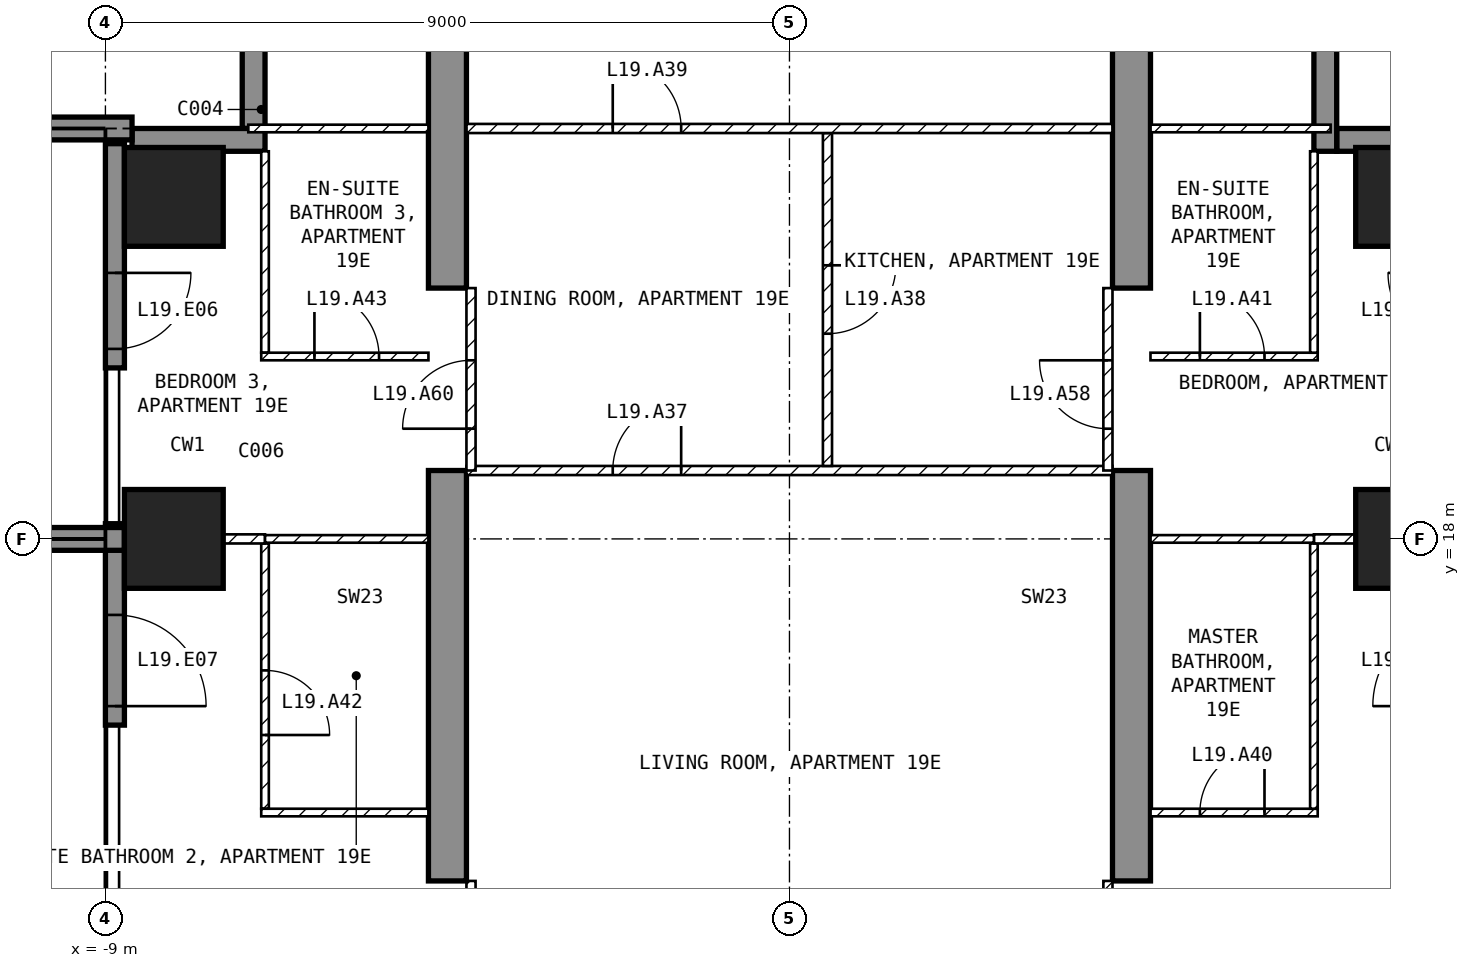
"""IFC4 building model, lengths in metres.
Left out: names, types, materials, properties, quantities, classifications, styles, units other than length and angle.
Written with IfcOpenShell. Run it as: python <this file> out.ifc"""

import sys

from ifc_helpers import new_model, si_unit, direction, frame, frame_2d, origin, origin_2d, place, context, subcontext, project, spatial, polyline, rectangle, outline, extrude, element, fill, save


model = new_model("IFC4")
c1 = context("Model", 3, precision=1e-05, world=origin(), true_north=direction((0.0, 1.0)))
c2 = subcontext(c1, "Body", "Model", "MODEL_VIEW")
j1 = project(units=[si_unit("LENGTHUNIT", "METRE"), si_unit("PLANEANGLEUNIT", "RADIAN")], contexts=[c1])
p1 = place(None, origin())
s1 = spatial("IfcSite", under=j1, at=p1, CompositionType="ELEMENT")
p2 = place(p1, origin())
s2 = spatial("IfcBuilding", under=s1, at=p2, CompositionType="ELEMENT")
p3 = place(p2, frame((0.0, 0.0, 85.5)))
s3 = spatial("IfcBuildingStorey", under=s2, at=p3, CompositionType="ELEMENT", Elevation=85.5)
for number, where, z_axis, x_axis in (
    (1, (-8.1, 18.0, -0.25), (0.0, 0.0, 1.0), (1.0, 0.0, 0.0)),
    (2, (-8.1, 22.5, -0.25), (0.0, 0.0, 1.0), (1.0, 0.0, 0.0)),
    (3, (8.1, 18.0, -0.25), (0.0, 0.0, 1.0), (1.0, 0.0, 0.0)),
    (4, (8.1, 22.5, -0.25), (0.0, 0.0, 1.0), (1.0, 0.0, 0.0)),
):
    element("IfcColumn", number, at=place(p3, frame(where, z_axis=z_axis, x_axis=x_axis)), inside=s3, PredefinedType="COLUMN", context=c2, shape_type="SweptSolid", body=[
        extrude(rectangle(XDim=1.3, YDim=1.3, at=origin_2d()), origin(), (0.0, 0.0, 1.0), 3.5),
    ])
for number, where, z_axis, x_axis in (
    (5, (-4.75, 9.0, -0.25), (1.0, 0.0, 0.0), (0.0, 1.0, 0.0)),
    (6, (4.25, 9.0, -0.25), (1.0, 0.0, 0.0), (0.0, 1.0, 0.0)),
):
    element("IfcWall", number, at=place(p3, frame(where, z_axis=z_axis, x_axis=x_axis)), inside=s3, PredefinedType="SHEAR", context=c2, shape_type="SweptSolid", body=[
        extrude(outline(polyline([(0.0, 0.0), (2.1, 0.0), (2.1, 2.65), (4.5, 2.65), (4.5, 0.0), (9.9, 0.0), (9.9, 2.65), (12.3, 2.65), (12.3, 0.0), (16.45, 0.0), (16.45, 3.5), (0.0, 3.5), (0.0, 0.0)])), origin(), (0.0, 0.0, 1.0), 0.5),
    ])
p4 = place(p3, frame((-8.875, 23.2, 0.0), z_axis=(0.0, 0.0, 1.0), x_axis=(0.0, -1.0, 0.0)))
e7 = element("IfcWall", 7, at=p4, inside=s3, PredefinedType="SOLIDWALL", context=c2, shape_type="SweptSolid", body=[
    extrude(rectangle(XDim=2.95, YDim=0.25, at=frame_2d((1.475, 0.0))), origin(), (0.0, 0.0, 1.0), 3.25),
])
p5 = place(p4, frame((1.7, 0.0, 0.0)))
e8 = element("IfcOpeningElement", 8, at=p5, cuts=e7, PredefinedType="OPENING", context=c2, shape_type="SweptSolid", body=[
    extrude(rectangle(XDim=1.0, YDim=2.4, at=frame_2d((0.5, 1.2))), frame((0.0, 0.135, 0.0), z_axis=(0.0, -1.0, 0.0), x_axis=(1.0, 0.0, 0.0)), (0.0, 0.0, 1.0), 0.27),
])
p6 = place(p3, frame((-8.875, 18.2, 0.0), z_axis=(0.0, 0.0, 1.0), x_axis=(0.0, -1.0, 0.0)))
e9 = element("IfcWall", 9, at=p6, inside=s3, PredefinedType="SOLIDWALL", context=c2, shape_type="SweptSolid", body=[
    extrude(rectangle(XDim=2.65, YDim=0.25, at=frame_2d((1.325, 0.0))), origin(), (0.0, 0.0, 1.0), 3.25),
])
p7 = place(p6, frame((1.2, 0.0, 0.0)))
e10 = element("IfcOpeningElement", 10, at=p7, cuts=e9, PredefinedType="OPENING", context=c2, shape_type="SweptSolid", body=[
    extrude(rectangle(XDim=1.2, YDim=2.4, at=frame_2d((0.6, 1.2))), frame((0.0, 0.135, 0.0), z_axis=(0.0, -1.0, 0.0), x_axis=(1.0, 0.0, 0.0)), (0.0, 0.0, 1.0), 0.27),
])
p8 = place(p3, frame((8.65, 23.25, 0.0), z_axis=(0.0, 0.0, 1.0), x_axis=(-1.0, 0.0, 0.0)))
e11 = element("IfcWall", 11, at=p8, inside=s3, PredefinedType="SOLIDWALL", context=c2, shape_type="SweptSolid", body=[
    extrude(rectangle(XDim=1.45, YDim=0.3, at=frame_2d((0.725, 0.0))), origin(), (0.0, 0.0, 1.0), 3.25),
])
p9 = place(p3, frame((7.05, 23.1, 0.0), z_axis=(0.0, 0.0, 1.0), x_axis=(0.0, 1.0, 0.0)))
e12 = element("IfcWall", 12, at=p9, inside=s3, PredefinedType="SOLIDWALL", context=c2, shape_type="SweptSolid", body=[
    extrude(rectangle(XDim=1.8, YDim=0.3, at=frame_2d((0.9, 0.0))), origin(), (0.0, 0.0, 1.0), 3.25),
])
p10 = place(p3, frame((-7.05, 25.2, 0.0), z_axis=(0.0, 0.0, 1.0), x_axis=(0.0, -1.0, 0.0)))
e13 = element("IfcWall", 13, at=p10, inside=s3, PredefinedType="SOLIDWALL", context=c2, shape_type="SweptSolid", body=[
    extrude(rectangle(XDim=1.8, YDim=0.3, at=frame_2d((0.9, 0.0))), origin(), (0.0, 0.0, 1.0), 3.25),
])
p11 = place(p3, frame((-6.9, 23.25, 0.0), z_axis=(0.0, 0.0, 1.0), x_axis=(-1.0, 0.0, 0.0)))
e14 = element("IfcWall", 14, at=p11, inside=s3, PredefinedType="SOLIDWALL", context=c2, shape_type="SweptSolid", body=[
    extrude(rectangle(XDim=1.75, YDim=0.3, at=frame_2d((0.875, 0.0))), origin(), (0.0, 0.0, 1.0), 3.25),
])
p12 = place(p3, frame((-8.75, 18.0, 0.0), z_axis=(0.0, 0.0, 1.0), x_axis=(-1.0, 0.0, 0.0)))
e15 = element("IfcWall", 15, at=p12, inside=s3, PredefinedType="SOLIDWALL", context=c2, shape_type="SweptSolid", body=[
    extrude(rectangle(XDim=2.95, YDim=0.3, at=frame_2d((1.475, 0.0))), origin(), (0.0, 0.0, 1.0), 3.25),
])
p13 = place(p3, frame((-8.65, 23.4, 0.0), z_axis=(0.0, 0.0, 1.0), x_axis=(-1.0, 0.0, 0.0)))
e16 = element("IfcWall", 16, at=p13, inside=s3, PredefinedType="SOLIDWALL", context=c2, shape_type="SweptSolid", body=[
    extrude(rectangle(XDim=3.05, YDim=0.3, at=frame_2d((1.525, 0.0))), origin(), (0.0, 0.0, 1.0), 3.25),
])
p14 = place(p3, frame((-4.25, 18.9, 0.0), z_axis=(0.0, 0.0, 1.0), x_axis=(1.0, 0.0, 0.0)))
e17 = element("IfcWall", 17, at=p14, inside=s3, PredefinedType="PARTITIONING", context=c2, shape_type="SweptSolid", body=[
    extrude(rectangle(XDim=8.5, YDim=0.12, at=frame_2d((4.25, 0.0))), origin(), (0.0, 0.0, 1.0), 3.25),
])
p15 = place(p14, frame((1.925, 0.0, 0.0)))
e18 = element("IfcOpeningElement", 18, at=p15, cuts=e17, PredefinedType="OPENING", context=c2, shape_type="SweptSolid", body=[
    extrude(rectangle(XDim=0.9, YDim=2.1, at=frame_2d((0.45, 1.05))), frame((0.0, 0.07, 0.0), z_axis=(0.0, -1.0, 0.0), x_axis=(1.0, 0.0, 0.0)), (0.0, 0.0, 1.0), 0.14),
])
p16 = place(p3, frame((0.5, 23.34, 0.0), z_axis=(0.0, 0.0, 1.0), x_axis=(0.0, -1.0, 0.0)))
e19 = element("IfcWall", 19, at=p16, inside=s3, PredefinedType="PARTITIONING", context=c2, shape_type="SweptSolid", body=[
    extrude(rectangle(XDim=4.38, YDim=0.12, at=frame_2d((2.19, 0.0))), origin(), (0.0, 0.0, 1.0), 3.25),
])
p17 = place(p16, frame((1.74, 0.0, 0.0)))
e20 = element("IfcOpeningElement", 20, at=p17, cuts=e19, PredefinedType="OPENING", context=c2, shape_type="SweptSolid", body=[
    extrude(rectangle(XDim=0.9, YDim=2.1, at=frame_2d((0.45, 1.05))), frame((0.0, 0.07, 0.0), z_axis=(0.0, -1.0, 0.0), x_axis=(1.0, 0.0, 0.0)), (0.0, 0.0, 1.0), 0.14),
])
p18 = place(p3, frame((-4.25, 23.4, 0.0), z_axis=(0.0, 0.0, 1.0), x_axis=(1.0, 0.0, 0.0)))
e21 = element("IfcWall", 21, at=p18, inside=s3, PredefinedType="PARTITIONING", context=c2, shape_type="SweptSolid", body=[
    extrude(rectangle(XDim=8.5, YDim=0.12, at=frame_2d((4.25, 0.0))), origin(), (0.0, 0.0, 1.0), 3.25),
])
p19 = place(p18, frame((1.925, 0.0, 0.0)))
e22 = element("IfcOpeningElement", 22, at=p19, cuts=e21, PredefinedType="OPENING", context=c2, shape_type="SweptSolid", body=[
    extrude(rectangle(XDim=0.9, YDim=2.1, at=frame_2d((0.45, 1.05))), frame((0.0, 0.07, 0.0), z_axis=(0.0, -1.0, 0.0), x_axis=(1.0, 0.0, 0.0)), (0.0, 0.0, 1.0), 0.14),
])
p20 = place(p3, frame((4.75, 14.4, 0.0), z_axis=(0.0, 0.0, 1.0), x_axis=(1.0, 0.0, 0.0)))
e23 = element("IfcWall", 23, at=p20, inside=s3, PredefinedType="PARTITIONING", context=c2, shape_type="SweptSolid", body=[
    extrude(rectangle(XDim=2.2, YDim=0.1, at=frame_2d((1.1, 0.0))), origin(), (0.0, 0.0, 1.0), 3.25),
])
p21 = place(p20, frame((0.65, 0.0, 0.0)))
e24 = element("IfcOpeningElement", 24, at=p21, cuts=e23, PredefinedType="OPENING", context=c2, shape_type="SweptSolid", body=[
    extrude(rectangle(XDim=0.85, YDim=2.1, at=frame_2d((0.425, 1.05))), frame((0.0, 0.06, 0.0), z_axis=(0.0, -1.0, 0.0), x_axis=(1.0, 0.0, 0.0)), (0.0, 0.0, 1.0), 0.12),
])
p22 = place(p3, frame((6.9, 14.45, 0.0), z_axis=(0.0, 0.0, 1.0), x_axis=(0.0, 1.0, 0.0)))
e25 = element("IfcWall", 25, at=p22, inside=s3, PredefinedType="PARTITIONING", context=c2, shape_type="SweptSolid", body=[
    extrude(rectangle(XDim=3.49, YDim=0.1, at=frame_2d((1.745, 0.0))), origin(), (0.0, 0.0, 1.0), 3.25),
])
p23 = place(p3, frame((6.9, 18.0, 0.0), z_axis=(0.0, 0.0, 1.0), x_axis=(1.0, 0.0, 0.0)))
e26 = element("IfcWall", 26, at=p23, inside=s3, PredefinedType="PARTITIONING", context=c2, shape_type="SweptSolid", body=[
    extrude(rectangle(XDim=0.55, YDim=0.12, at=frame_2d((0.275, 0.0))), origin(), (0.0, 0.0, 1.0), 2.346),
])
p24 = place(p3, frame((4.75, 18.0, 0.0), z_axis=(0.0, 0.0, 1.0), x_axis=(1.0, 0.0, 0.0)))
e27 = element("IfcWall", 27, at=p24, inside=s3, PredefinedType="PARTITIONING", context=c2, shape_type="SweptSolid", body=[
    extrude(rectangle(XDim=2.15, YDim=0.1, at=frame_2d((1.075, 0.0))), origin(), (0.0, 0.0, 1.0), 2.346),
])
p25 = place(p3, frame((4.75, 20.4, 0.0), z_axis=(0.0, 0.0, 1.0), x_axis=(1.0, 0.0, 0.0)))
e28 = element("IfcWall", 28, at=p25, inside=s3, PredefinedType="PARTITIONING", context=c2, shape_type="SweptSolid", body=[
    extrude(rectangle(XDim=2.2, YDim=0.1, at=frame_2d((1.1, 0.0))), origin(), (0.0, 0.0, 1.0), 3.25),
])
p26 = place(p25, frame((0.65, 0.0, 0.0)))
e29 = element("IfcOpeningElement", 29, at=p26, cuts=e28, PredefinedType="OPENING", context=c2, shape_type="SweptSolid", body=[
    extrude(rectangle(XDim=0.85, YDim=2.1, at=frame_2d((0.425, 1.05))), frame((0.0, 0.06, 0.0), z_axis=(0.0, -1.0, 0.0), x_axis=(1.0, 0.0, 0.0)), (0.0, 0.0, 1.0), 0.12),
])
p27 = place(p3, frame((6.9, 20.45, 0.0), z_axis=(0.0, 0.0, 1.0), x_axis=(0.0, 1.0, 0.0)))
e30 = element("IfcWall", 30, at=p27, inside=s3, PredefinedType="PARTITIONING", context=c2, shape_type="SweptSolid", body=[
    extrude(rectangle(XDim=2.65, YDim=0.1, at=frame_2d((1.325, 0.0))), origin(), (0.0, 0.0, 1.0), 3.25),
])
p28 = place(p3, frame((4.75, 23.4, 0.0), z_axis=(0.0, 0.0, 1.0), x_axis=(1.0, 0.0, 0.0)))
e31 = element("IfcWall", 31, at=p28, inside=s3, PredefinedType="PARTITIONING", context=c2, shape_type="SweptSolid", body=[
    extrude(rectangle(XDim=2.37, YDim=0.1, at=frame_2d((1.185, 0.0))), origin(), (0.0, 0.0, 1.0), 3.25),
])
p29 = place(p3, frame((-6.9, 17.94, 0.0), z_axis=(0.0, 0.0, 1.0), x_axis=(0.0, -1.0, 0.0)))
e32 = element("IfcWall", 32, at=p29, inside=s3, PredefinedType="PARTITIONING", context=c2, shape_type="SweptSolid", body=[
    extrude(rectangle(XDim=3.49, YDim=0.1, at=frame_2d((1.745, 0.0))), origin(), (0.0, 0.0, 1.0), 3.25),
])
p30 = place(p29, frame((1.67, 0.0, 0.0)))
e33 = element("IfcOpeningElement", 33, at=p30, cuts=e32, PredefinedType="OPENING", context=c2, shape_type="SweptSolid", body=[
    extrude(rectangle(XDim=0.85, YDim=2.1, at=frame_2d((0.425, 1.05))), frame((0.0, 0.06, 0.0), z_axis=(0.0, -1.0, 0.0), x_axis=(1.0, 0.0, 0.0)), (0.0, 0.0, 1.0), 0.12),
])
p31 = place(p3, frame((-6.95, 14.4, 0.0), z_axis=(0.0, 0.0, 1.0), x_axis=(1.0, 0.0, 0.0)))
e34 = element("IfcWall", 34, at=p31, inside=s3, PredefinedType="PARTITIONING", context=c2, shape_type="SweptSolid", body=[
    extrude(rectangle(XDim=2.2, YDim=0.1, at=frame_2d((1.1, 0.0))), origin(), (0.0, 0.0, 1.0), 3.25),
])
p32 = place(p3, frame((-7.45, 18.0, 0.0), z_axis=(0.0, 0.0, 1.0), x_axis=(1.0, 0.0, 0.0)))
e35 = element("IfcWall", 35, at=p32, inside=s3, PredefinedType="PARTITIONING", context=c2, shape_type="SweptSolid", body=[
    extrude(rectangle(XDim=0.55, YDim=0.12, at=frame_2d((0.275, 0.0))), origin(), (0.0, 0.0, 1.0), 2.346),
])
p33 = place(p3, frame((-6.9, 18.0, 0.0), z_axis=(0.0, 0.0, 1.0), x_axis=(1.0, 0.0, 0.0)))
e36 = element("IfcWall", 36, at=p33, inside=s3, PredefinedType="PARTITIONING", context=c2, shape_type="SweptSolid", body=[
    extrude(rectangle(XDim=2.15, YDim=0.1, at=frame_2d((1.075, 0.0))), origin(), (0.0, 0.0, 1.0), 2.346),
])
p34 = place(p3, frame((-6.9, 23.1, 0.0), z_axis=(0.0, 0.0, 1.0), x_axis=(0.0, -1.0, 0.0)))
e37 = element("IfcWall", 37, at=p34, inside=s3, PredefinedType="PARTITIONING", context=c2, shape_type="SweptSolid", body=[
    extrude(rectangle(XDim=2.65, YDim=0.1, at=frame_2d((1.325, 0.0))), origin(), (0.0, 0.0, 1.0), 3.25),
])
p35 = place(p3, frame((-6.95, 20.4, 0.0), z_axis=(0.0, 0.0, 1.0), x_axis=(1.0, 0.0, 0.0)))
e38 = element("IfcWall", 38, at=p35, inside=s3, PredefinedType="PARTITIONING", context=c2, shape_type="SweptSolid", body=[
    extrude(rectangle(XDim=2.2, YDim=0.1, at=frame_2d((1.1, 0.0))), origin(), (0.0, 0.0, 1.0), 3.25),
])
p36 = place(p35, frame((0.7, 0.0, 0.0)))
e39 = element("IfcOpeningElement", 39, at=p36, cuts=e38, PredefinedType="OPENING", context=c2, shape_type="SweptSolid", body=[
    extrude(rectangle(XDim=0.85, YDim=2.1, at=frame_2d((0.425, 1.05))), frame((0.0, 0.06, 0.0), z_axis=(0.0, -1.0, 0.0), x_axis=(1.0, 0.0, 0.0)), (0.0, 0.0, 1.0), 0.12),
])
p37 = place(p3, frame((-7.12, 23.4, 0.0), z_axis=(0.0, 0.0, 1.0), x_axis=(1.0, 0.0, 0.0)))
e40 = element("IfcWall", 40, at=p37, inside=s3, PredefinedType="PARTITIONING", context=c2, shape_type="SweptSolid", body=[
    extrude(rectangle(XDim=2.37, YDim=0.1, at=frame_2d((1.185, 0.0))), origin(), (0.0, 0.0, 1.0), 3.25),
])
p38 = place(p3, frame((4.19, 11.1, 0.0), z_axis=(0.0, 0.0, 1.0), x_axis=(0.0, 1.0, 0.0)))
e41 = element("IfcWall", 41, at=p38, inside=s3, PredefinedType="PARTITIONING", context=c2, shape_type="SweptSolid", body=[
    extrude(rectangle(XDim=2.4, YDim=0.12, at=frame_2d((1.2, 0.0))), origin(), (0.0, 0.0, 1.0), 2.4),
])
p39 = place(p38, frame((0.75, 0.0, 0.0)))
e42 = element("IfcOpeningElement", 42, at=p39, cuts=e41, PredefinedType="OPENING", context=c2, shape_type="SweptSolid", body=[
    extrude(rectangle(XDim=0.9, YDim=2.1, at=frame_2d((0.45, 1.05))), frame((0.0, 0.07, 0.0), z_axis=(0.0, -1.0, 0.0), x_axis=(1.0, 0.0, 0.0)), (0.0, 0.0, 1.0), 0.14),
])
p40 = place(p3, frame((4.19, 18.9, 0.0), z_axis=(0.0, 0.0, 1.0), x_axis=(0.0, 1.0, 0.0)))
e43 = element("IfcWall", 43, at=p40, inside=s3, PredefinedType="PARTITIONING", context=c2, shape_type="SweptSolid", body=[
    extrude(rectangle(XDim=2.4, YDim=0.12, at=frame_2d((1.2, 0.0))), origin(), (0.0, 0.0, 1.0), 2.4),
])
p41 = place(p40, frame((0.55, 0.0, 0.0)))
e44 = element("IfcOpeningElement", 44, at=p41, cuts=e43, PredefinedType="OPENING", context=c2, shape_type="SweptSolid", body=[
    extrude(rectangle(XDim=0.9, YDim=2.1, at=frame_2d((0.45, 1.05))), frame((0.0, 0.07, 0.0), z_axis=(0.0, -1.0, 0.0), x_axis=(1.0, 0.0, 0.0)), (0.0, 0.0, 1.0), 0.14),
])
p42 = place(p3, frame((-4.19, 11.1, 0.0), z_axis=(0.0, 0.0, 1.0), x_axis=(0.0, 1.0, 0.0)))
e45 = element("IfcWall", 45, at=p42, inside=s3, PredefinedType="PARTITIONING", context=c2, shape_type="SweptSolid", body=[
    extrude(rectangle(XDim=2.4, YDim=0.12, at=frame_2d((1.2, 0.0))), origin(), (0.0, 0.0, 1.0), 2.4),
])
p43 = place(p42, frame((0.75, 0.0, 0.0)))
e46 = element("IfcOpeningElement", 46, at=p43, cuts=e45, PredefinedType="OPENING", context=c2, shape_type="SweptSolid", body=[
    extrude(rectangle(XDim=0.9, YDim=2.1, at=frame_2d((0.45, 1.05))), frame((0.0, 0.07, 0.0), z_axis=(0.0, -1.0, 0.0), x_axis=(1.0, 0.0, 0.0)), (0.0, 0.0, 1.0), 0.14),
])
p44 = place(p3, frame((-4.19, 18.9, 0.0), z_axis=(0.0, 0.0, 1.0), x_axis=(0.0, 1.0, 0.0)))
e47 = element("IfcWall", 47, at=p44, inside=s3, PredefinedType="PARTITIONING", context=c2, shape_type="SweptSolid", body=[
    extrude(rectangle(XDim=2.4, YDim=0.12, at=frame_2d((1.2, 0.0))), origin(), (0.0, 0.0, 1.0), 2.4),
])
p45 = place(p44, frame((0.55, 0.0, 0.0)))
e48 = element("IfcOpeningElement", 48, at=p45, cuts=e47, PredefinedType="OPENING", context=c2, shape_type="SweptSolid", body=[
    extrude(rectangle(XDim=0.9, YDim=2.1, at=frame_2d((0.45, 1.05))), frame((0.0, 0.07, 0.0), z_axis=(0.0, -1.0, 0.0), x_axis=(1.0, 0.0, 0.0)), (0.0, 0.0, 1.0), 0.14),
])
p46 = place(p5, origin())
e49 = element("IfcDoor", 49, at=p46, inside=s3, OperationType="SINGLE_SWING_LEFT", PredefinedType="DOOR", context=c2, shape_type="SweptSolid", body=[
    extrude(rectangle(XDim=1.0, YDim=2.4, at=frame_2d((0.5, 1.2))), frame((0.0, 0.025, 0.0), z_axis=(0.0, -1.0, 0.0), x_axis=(1.0, 0.0, 0.0)), (0.0, 0.0, 1.0), 0.05),
])
fill(e8, e49)
p47 = place(p7, origin())
e50 = element("IfcDoor", 50, at=p47, inside=s3, OperationType="SINGLE_SWING_RIGHT", PredefinedType="DOOR", context=c2, shape_type="SweptSolid", body=[
    extrude(rectangle(XDim=1.2, YDim=2.4, at=frame_2d((0.6, 1.2))), frame((0.0, 0.025, 0.0), z_axis=(0.0, -1.0, 0.0), x_axis=(1.0, 0.0, 0.0)), (0.0, 0.0, 1.0), 0.05),
])
fill(e10, e50)
p48 = place(p15, origin())
e51 = element("IfcDoor", 51, at=p48, inside=s3, OperationType="SINGLE_SWING_RIGHT", PredefinedType="DOOR", context=c2, shape_type="SweptSolid", body=[
    extrude(rectangle(XDim=0.9, YDim=2.1, at=frame_2d((0.45, 1.05))), frame((0.0, 0.025, 0.0), z_axis=(0.0, -1.0, 0.0), x_axis=(1.0, 0.0, 0.0)), (0.0, 0.0, 1.0), 0.05),
])
fill(e18, e51)
p49 = place(p17, origin())
e52 = element("IfcDoor", 52, at=p49, inside=s3, OperationType="SINGLE_SWING_LEFT", PredefinedType="DOOR", context=c2, shape_type="SweptSolid", body=[
    extrude(rectangle(XDim=0.9, YDim=2.1, at=frame_2d((0.45, 1.05))), frame((0.0, 0.025, 0.0), z_axis=(0.0, -1.0, 0.0), x_axis=(1.0, 0.0, 0.0)), (0.0, 0.0, 1.0), 0.05),
])
fill(e20, e52)
p50 = place(p19, origin())
e53 = element("IfcDoor", 53, at=p50, inside=s3, OperationType="SINGLE_SWING_LEFT", PredefinedType="DOOR", context=c2, shape_type="SweptSolid", body=[
    extrude(rectangle(XDim=0.9, YDim=2.1, at=frame_2d((0.45, 1.05))), frame((0.0, 0.025, 0.0), z_axis=(0.0, -1.0, 0.0), x_axis=(1.0, 0.0, 0.0)), (0.0, 0.0, 1.0), 0.05),
])
fill(e22, e53)
p51 = place(p21, origin())
e54 = element("IfcDoor", 54, at=p51, inside=s3, OperationType="SINGLE_SWING_RIGHT", PredefinedType="DOOR", context=c2, shape_type="SweptSolid", body=[
    extrude(rectangle(XDim=0.85, YDim=2.1, at=frame_2d((0.425, 1.05))), frame((0.0, 0.025, 0.0), z_axis=(0.0, -1.0, 0.0), x_axis=(1.0, 0.0, 0.0)), (0.0, 0.0, 1.0), 0.05),
])
fill(e24, e54)
p52 = place(p26, origin())
e55 = element("IfcDoor", 55, at=p52, inside=s3, OperationType="SINGLE_SWING_LEFT", PredefinedType="DOOR", context=c2, shape_type="SweptSolid", body=[
    extrude(rectangle(XDim=0.85, YDim=2.1, at=frame_2d((0.425, 1.05))), frame((0.0, 0.025, 0.0), z_axis=(0.0, -1.0, 0.0), x_axis=(1.0, 0.0, 0.0)), (0.0, 0.0, 1.0), 0.05),
])
fill(e29, e55)
p53 = place(p30, origin())
e56 = element("IfcDoor", 56, at=p53, inside=s3, OperationType="SINGLE_SWING_RIGHT", PredefinedType="DOOR", context=c2, shape_type="SweptSolid", body=[
    extrude(rectangle(XDim=0.85, YDim=2.1, at=frame_2d((0.425, 1.05))), frame((0.0, 0.025, 0.0), z_axis=(0.0, -1.0, 0.0), x_axis=(1.0, 0.0, 0.0)), (0.0, 0.0, 1.0), 0.05),
])
fill(e33, e56)
p54 = place(p36, origin())
e57 = element("IfcDoor", 57, at=p54, inside=s3, OperationType="SINGLE_SWING_LEFT", PredefinedType="DOOR", context=c2, shape_type="SweptSolid", body=[
    extrude(rectangle(XDim=0.85, YDim=2.1, at=frame_2d((0.425, 1.05))), frame((0.0, 0.025, 0.0), z_axis=(0.0, -1.0, 0.0), x_axis=(1.0, 0.0, 0.0)), (0.0, 0.0, 1.0), 0.05),
])
fill(e39, e57)
p55 = place(p41, origin())
e58 = element("IfcDoor", 58, at=p55, inside=s3, OperationType="SINGLE_SWING_RIGHT", PredefinedType="DOOR", context=c2, shape_type="SweptSolid", body=[
    extrude(rectangle(XDim=0.9, YDim=2.1, at=frame_2d((0.45, 1.05))), frame((0.0, 0.025, 0.0), z_axis=(0.0, -1.0, 0.0), x_axis=(1.0, 0.0, 0.0)), (0.0, 0.0, 1.0), 0.05),
])
fill(e44, e58)
p56 = place(p45, origin())
e59 = element("IfcDoor", 59, at=p56, inside=s3, OperationType="SINGLE_SWING_LEFT", PredefinedType="DOOR", context=c2, shape_type="SweptSolid", body=[
    extrude(rectangle(XDim=0.9, YDim=2.1, at=frame_2d((0.45, 1.05))), frame((0.0, 0.025, 0.0), z_axis=(0.0, -1.0, 0.0), x_axis=(1.0, 0.0, 0.0)), (0.0, 0.0, 1.0), 0.05),
])
fill(e48, e59)
save(model, sys.argv[1])
